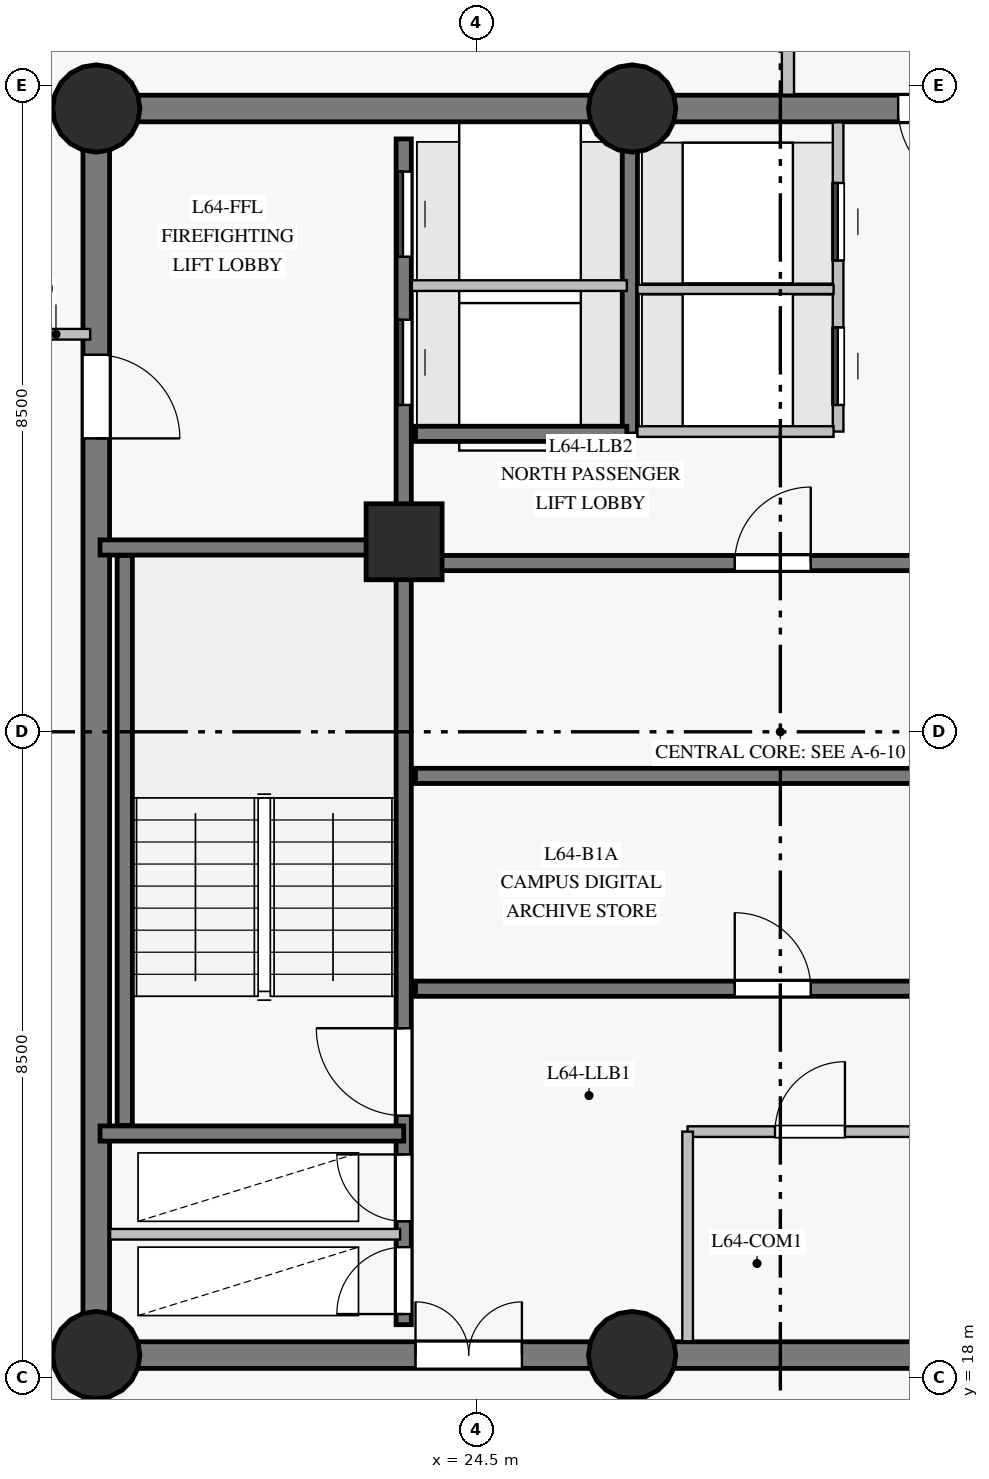
"""IFC4 building model, lengths in metres.
Left out: names, types, materials, properties, quantities, classifications, styles, units other than length and angle.
Written with IfcOpenShell. Run it as: python <this file> out.ifc"""

import sys

from ifc_helpers import new_model, si_unit, direction, frame, frame_2d, origin, origin_with_axes, origin_2d, place, context, subcontext, project, spatial, rectangle, circle, extrude, source, transform, mapped, element, fill, save


model = new_model("IFC4")
c1 = context("Model", 3, precision=1e-05, world=origin(), true_north=direction((0.0, 1.0)))
c2 = subcontext(c1, "Body", "Model", "MODEL_VIEW")
j1 = project(units=[si_unit("LENGTHUNIT", "METRE"), si_unit("PLANEANGLEUNIT", "RADIAN")], contexts=[c1])
p1 = place(None, origin())
s1 = spatial("IfcSite", under=j1, at=p1, CompositionType="ELEMENT")
p2 = place(p1, origin())
s2 = spatial("IfcBuilding", under=s1, at=p2, CompositionType="ELEMENT")
p3 = place(p2, frame((0.0, 0.0, 219.95)))
s3 = spatial("IfcBuildingStorey", under=s2, at=p3, CompositionType="ELEMENT", Elevation=219.95)
p4 = place(p3, frame((19.5, 18.3, 0.0), z_axis=(0.0, 0.0, 1.0), x_axis=(1.0, 0.0, 0.0)))
e1 = element("IfcWall", 1, at=p4, inside=s3, PredefinedType="SHEAR", context=c2, shape_type="SweptSolid", body=[
    extrude(rectangle(XDim=7.05, YDim=0.35, at=frame_2d((3.525, 0.0))), origin(), (0.0, 0.0, 1.0), 2.85),
])
p5 = place(p4, frame((4.2, 0.0, 0.0)))
e2 = element("IfcOpeningElement", 2, at=p5, cuts=e1, PredefinedType="OPENING", context=c2, shape_type="SweptSolid", body=[
    extrude(rectangle(XDim=1.4, YDim=2.2, at=frame_2d((0.7, 1.1))), frame((0.0, 0.185, 0.0), z_axis=(0.0, -1.0, 0.0), x_axis=(1.0, 0.0, 0.0)), (0.0, 0.0, 1.0), 0.37),
])
p6 = place(p3, frame((26.55, 18.3, 0.0), z_axis=(0.0, 0.0, 1.0), x_axis=(1.0, 0.0, 0.0)))
e3 = element("IfcWall", 3, at=p6, inside=s3, PredefinedType="SHEAR", context=c2, shape_type="SweptSolid", body=[
    extrude(rectangle(XDim=10.95, YDim=0.35, at=frame_2d((5.475, 0.0))), origin(), (0.0, 0.0, 1.0), 2.85),
])
p7 = place(p6, frame((4.55, 0.0, 0.0)))
e4 = element("IfcOpeningElement", 4, at=p7, cuts=e3, PredefinedType="OPENING", context=c2, shape_type="SweptSolid", body=[
    extrude(rectangle(XDim=1.4, YDim=2.2, at=frame_2d((0.7, 1.1))), frame((0.0, 0.185, 0.0), z_axis=(0.0, -1.0, 0.0), x_axis=(1.0, 0.0, 0.0)), (0.0, 0.0, 1.0), 0.37),
])
p8 = place(p3, frame((37.5, 34.7, 0.0), z_axis=(0.0, 0.0, 1.0), x_axis=(-1.0, 0.0, 0.0)))
e5 = element("IfcWall", 5, at=p8, inside=s3, PredefinedType="SHEAR", context=c2, shape_type="SweptSolid", body=[
    extrude(rectangle(XDim=10.95, YDim=0.35, at=frame_2d((5.475, 0.0))), origin(), (0.0, 0.0, 1.0), 2.85),
])
p9 = place(p8, frame((2.15, 0.0, 0.0)))
e6 = element("IfcOpeningElement", 6, at=p9, cuts=e5, PredefinedType="OPENING", context=c2, shape_type="SweptSolid", body=[
    extrude(rectangle(XDim=1.2, YDim=2.15, at=frame_2d((0.6, 1.075))), frame((0.0, 0.185, 0.0), z_axis=(0.0, -1.0, 0.0), x_axis=(1.0, 0.0, 0.0)), (0.0, 0.0, 1.0), 0.37),
])
p10 = place(p8, frame((6.35, 0.0, 0.0)))
e7 = element("IfcOpeningElement", 7, at=p10, cuts=e5, PredefinedType="OPENING", context=c2, shape_type="SweptSolid", body=[
    extrude(rectangle(XDim=1.1, YDim=2.15, at=frame_2d((0.55, 1.075))), frame((0.0, 0.185, 0.0), z_axis=(0.0, -1.0, 0.0), x_axis=(1.0, 0.0, 0.0)), (0.0, 0.0, 1.0), 0.37),
])
p11 = place(p3, frame((26.55, 34.7, 0.0), z_axis=(0.0, 0.0, 1.0), x_axis=(-1.0, 0.0, 0.0)))
e8 = element("IfcWall", 8, at=p11, inside=s3, PredefinedType="SHEAR", context=c2, shape_type="SweptSolid", body=[
    extrude(rectangle(XDim=7.05, YDim=0.35, at=frame_2d((3.525, 0.0))), origin(), (0.0, 0.0, 1.0), 2.85),
])
p12 = place(p3, frame((19.5, 34.7, 0.0), z_axis=(0.0, 0.0, 1.0), x_axis=(0.0, -1.0, 0.0)))
e9 = element("IfcWall", 9, at=p12, inside=s3, PredefinedType="SHEAR", context=c2, shape_type="SweptSolid", body=[
    extrude(rectangle(XDim=16.4, YDim=0.35, at=frame_2d((8.2, 0.0))), origin(), (0.0, 0.0, 1.0), 2.85),
])
p13 = place(p12, frame((3.24, 0.0, 0.0)))
e10 = element("IfcOpeningElement", 10, at=p13, cuts=e9, PredefinedType="OPENING", context=c2, shape_type="SweptSolid", body=[
    extrude(rectangle(XDim=1.1, YDim=2.15, at=frame_2d((0.55, 1.075))), frame((0.0, 0.185, 0.0), z_axis=(0.0, -1.0, 0.0), x_axis=(1.0, 0.0, 0.0)), (0.0, 0.0, 1.0), 0.37),
])
m1 = source(origin_with_axes(), c2, "Body", "SweptSolid", [
    extrude(circle(Radius=0.575, at=origin_2d()), origin(), (0.0, 0.0, 1.0), 3.05),
])
for number, where, z_axis, x_axis in (
    (11, (19.5, 18.3, 0.0), (0.0, 0.0, 1.0), (1.0, 0.0, 0.0)),
    (12, (26.55, 18.3, 0.0), (0.0, 0.0, 1.0), (1.0, 0.0, 0.0)),
    (13, (19.5, 34.7, 0.0), (0.0, 0.0, 1.0), (1.0, 0.0, 0.0)),
    (14, (26.55, 34.7, 0.0), (0.0, 0.0, 1.0), (1.0, 0.0, 0.0)),
):
    element("IfcColumn", number, at=place(p3, frame(where, z_axis=z_axis, x_axis=x_axis)), inside=s3, PredefinedType="COLUMN", context=c2, shape_type="MappedRepresentation", body=[
        mapped(m1, transform((0.0, 0.0, 0.0), scale=1.0)),
    ])
m2 = source(origin_with_axes(), c2, "Body", "SweptSolid", [
    extrude(rectangle(XDim=1.0, YDim=1.0, at=origin_2d()), origin(), (0.0, 0.0, 1.0), 3.05),
])
p14 = place(p3, frame((23.55, 29.0, 0.0), z_axis=(0.0, 0.0, 1.0), x_axis=(1.0, 0.0, 0.0)))
e15 = element("IfcColumn", 15, at=p14, inside=s3, PredefinedType="COLUMN", context=c2, shape_type="MappedRepresentation", body=[
    mapped(m2, transform((0.0, 0.0, 0.0), scale=1.0)),
])
p15 = place(p3, frame((23.545, 18.7, 0.0), z_axis=(0.0, 0.0, 1.0), x_axis=(0.0, 1.0, 0.0)))
e16 = element("IfcWall", 16, at=p15, inside=s3, PredefinedType="SHEAR", context=c2, shape_type="SweptSolid", body=[
    extrude(rectangle(XDim=15.6, YDim=0.2, at=frame_2d((7.8, 0.0))), origin(), (0.0, 0.0, 1.0), 2.85),
])
p16 = place(p15, frame((2.75, 0.0, 0.0)))
e17 = element("IfcOpeningElement", 17, at=p16, cuts=e16, PredefinedType="OPENING", context=c2, shape_type="SweptSolid", body=[
    extrude(rectangle(XDim=1.15, YDim=2.15, at=frame_2d((0.575, 1.075))), frame((0.0, 0.11, 0.0), z_axis=(0.0, -1.0, 0.0), x_axis=(1.0, 0.0, 0.0)), (0.0, 0.0, 1.0), 0.22),
])
p17 = place(p15, frame((0.14, 0.0, 0.0)))
e18 = element("IfcOpeningElement", 18, at=p17, cuts=e16, PredefinedType="OPENING", context=c2, shape_type="SweptSolid", body=[
    extrude(rectangle(XDim=0.88, YDim=2.1, at=frame_2d((0.44, 1.05))), frame((0.0, 0.11, 0.0), z_axis=(0.0, -1.0, 0.0), x_axis=(1.0, 0.0, 0.0)), (0.0, 0.0, 1.0), 0.22),
])
p18 = place(p15, frame((1.36, 0.0, 0.0)))
e19 = element("IfcOpeningElement", 19, at=p18, cuts=e16, PredefinedType="OPENING", context=c2, shape_type="SweptSolid", body=[
    extrude(rectangle(XDim=0.88, YDim=2.1, at=frame_2d((0.44, 1.05))), frame((0.0, 0.11, 0.0), z_axis=(0.0, -1.0, 0.0), x_axis=(1.0, 0.0, 0.0)), (0.0, 0.0, 1.0), 0.22),
])
p19 = place(p15, frame((12.1, 0.0, 0.0)))
e20 = element("IfcOpeningElement", 20, at=p19, cuts=e16, PredefinedType="OPENING", context=c2, shape_type="SweptSolid", body=[
    extrude(rectangle(XDim=1.12, YDim=2.15, at=frame_2d((0.56, 1.075))), frame((0.0, 0.11, 0.0), z_axis=(0.0, -1.0, 0.0), x_axis=(1.0, 0.0, 0.0)), (0.0, 0.0, 1.0), 0.22),
])
p20 = place(p15, frame((14.05, 0.0, 0.0)))
e21 = element("IfcOpeningElement", 21, at=p20, cuts=e16, PredefinedType="OPENING", context=c2, shape_type="SweptSolid", body=[
    extrude(rectangle(XDim=1.12, YDim=2.15, at=frame_2d((0.56, 1.075))), frame((0.0, 0.11, 0.0), z_axis=(0.0, -1.0, 0.0), x_axis=(1.0, 0.0, 0.0)), (0.0, 0.0, 1.0), 0.22),
])
p21 = place(p3, frame((23.7, 23.12, 0.0), z_axis=(0.0, 0.0, 1.0), x_axis=(1.0, 0.0, 0.0)))
e22 = element("IfcWall", 22, at=p21, inside=s3, PredefinedType="SHEAR", context=c2, shape_type="SweptSolid", body=[
    extrude(rectangle(XDim=9.6, YDim=0.2, at=frame_2d((4.8, 0.0))), origin(), (0.0, 0.0, 1.0), 2.85),
])
p22 = place(p21, frame((4.2, 0.0, 0.0)))
e23 = element("IfcOpeningElement", 23, at=p22, cuts=e22, PredefinedType="OPENING", context=c2, shape_type="SweptSolid", body=[
    extrude(rectangle(XDim=1.0, YDim=2.15, at=frame_2d((0.5, 1.075))), frame((0.0, 0.11, 0.0), z_axis=(0.0, -1.0, 0.0), x_axis=(1.0, 0.0, 0.0)), (0.0, 0.0, 1.0), 0.22),
])
p23 = place(p3, frame((23.7, 25.92, 0.0), z_axis=(0.0, 0.0, 1.0), x_axis=(1.0, 0.0, 0.0)))
e24 = element("IfcWall", 24, at=p23, inside=s3, PredefinedType="SHEAR", context=c2, shape_type="SweptSolid", body=[
    extrude(rectangle(XDim=9.6, YDim=0.2, at=frame_2d((4.8, 0.0))), origin(), (0.0, 0.0, 1.0), 2.85),
])
p24 = place(p3, frame((23.7, 28.72, 0.0), z_axis=(0.0, 0.0, 1.0), x_axis=(1.0, 0.0, 0.0)))
e25 = element("IfcWall", 25, at=p24, inside=s3, PredefinedType="SHEAR", context=c2, shape_type="SweptSolid", body=[
    extrude(rectangle(XDim=9.6, YDim=0.2, at=frame_2d((4.8, 0.0))), origin(), (0.0, 0.0, 1.0), 2.85),
])
p25 = place(p24, frame((4.2, 0.0, 0.0)))
e26 = element("IfcOpeningElement", 26, at=p25, cuts=e25, PredefinedType="OPENING", context=c2, shape_type="SweptSolid", body=[
    extrude(rectangle(XDim=1.0, YDim=2.15, at=frame_2d((0.5, 1.075))), frame((0.0, 0.11, 0.0), z_axis=(0.0, -1.0, 0.0), x_axis=(1.0, 0.0, 0.0)), (0.0, 0.0, 1.0), 0.22),
])
p26 = place(p3, frame((19.875, 21.32, 0.0), z_axis=(0.0, 0.0, 1.0), x_axis=(0.0, 1.0, 0.0)))
e27 = element("IfcWall", 27, at=p26, inside=s3, PredefinedType="SHEAR", context=c2, shape_type="SweptSolid", body=[
    extrude(rectangle(XDim=7.5, YDim=0.2, at=frame_2d((3.75, 0.0))), origin(), (0.0, 0.0, 1.0), 2.85),
])
for number, where, z_axis, x_axis in (
    (28, (19.55, 21.215, 0.0), (0.0, 0.0, 1.0), (1.0, 0.0, 0.0)),
    (29, (19.55, 28.925, 0.0), (0.0, 0.0, 1.0), (1.0, 0.0, 0.0)),
):
    element("IfcWall", number, at=place(p3, frame(where, z_axis=z_axis, x_axis=x_axis)), inside=s3, PredefinedType="SHEAR", context=c2, shape_type="SweptSolid", body=[
        extrude(rectangle(XDim=3.995, YDim=0.2, at=frame_2d((1.998, 0.0))), origin(), (0.0, 0.0, 1.0), 2.85),
    ])
p27 = place(p3, frame((26.52, 30.42, 0.0), z_axis=(0.0, 0.0, 1.0), x_axis=(0.0, 1.0, 0.0)))
e30 = element("IfcWall", 30, at=p27, inside=s3, PredefinedType="SHEAR", context=c2, shape_type="SweptSolid", body=[
    extrude(rectangle(XDim=3.86, YDim=0.2, at=frame_2d((1.93, 0.0))), origin(), (0.0, 0.0, 1.0), 2.85),
])
p28 = place(p3, frame((23.7, 30.42, 0.0), z_axis=(0.0, 0.0, 1.0), x_axis=(1.0, 0.0, 0.0)))
e31 = element("IfcWall", 31, at=p28, inside=s3, PredefinedType="SHEAR", context=c2, shape_type="SweptSolid", body=[
    extrude(rectangle(XDim=2.78, YDim=0.2, at=frame_2d((1.39, 0.0))), origin(), (0.0, 0.0, 1.0), 2.85),
])
p29 = place(p3, frame((29.26, 30.45, 0.0), z_axis=(0.0, 0.0, 1.0), x_axis=(0.0, 1.0, 0.0)))
e32 = element("IfcWall", 32, at=p29, inside=s3, PredefinedType="PARTITIONING", context=c2, shape_type="SweptSolid", body=[
    extrude(rectangle(XDim=4.068, YDim=0.14, at=frame_2d((2.034, 0.0))), origin(), (0.0, 0.0, 1.0), 2.85),
])
p30 = place(p29, frame((0.35, 0.0, 0.0)))
e33 = element("IfcOpeningElement", 33, at=p30, cuts=e32, PredefinedType="OPENING", context=c2, shape_type="SweptSolid", body=[
    extrude(rectangle(XDim=1.02, YDim=2.15, at=frame_2d((0.51, 1.075))), frame((0.0, 0.08, 0.0), z_axis=(0.0, -1.0, 0.0), x_axis=(1.0, 0.0, 0.0)), (0.0, 0.0, 1.0), 0.16),
])
p31 = place(p29, frame((2.25, 0.0, 0.0)))
e34 = element("IfcOpeningElement", 34, at=p31, cuts=e32, PredefinedType="OPENING", context=c2, shape_type="SweptSolid", body=[
    extrude(rectangle(XDim=1.02, YDim=2.15, at=frame_2d((0.51, 1.075))), frame((0.0, 0.08, 0.0), z_axis=(0.0, -1.0, 0.0), x_axis=(1.0, 0.0, 0.0)), (0.0, 0.0, 1.0), 0.16),
])
p32 = place(p3, frame((19.682, 19.89, 0.0), z_axis=(0.0, 0.0, 1.0), x_axis=(1.0, 0.0, 0.0)))
e35 = element("IfcWall", 35, at=p32, inside=s3, PredefinedType="PARTITIONING", context=c2, shape_type="SweptSolid", body=[
    extrude(rectangle(XDim=3.815, YDim=0.14, at=frame_2d((1.908, 0.0))), origin(), (0.0, 0.0, 1.0), 2.85),
])
p33 = place(p3, frame((27.28, 21.24, 0.0), z_axis=(0.0, 0.0, 1.0), x_axis=(1.0, 0.0, 0.0)))
e36 = element("IfcWall", 36, at=p33, inside=s3, PredefinedType="PARTITIONING", context=c2, shape_type="SweptSolid", body=[
    extrude(rectangle(XDim=3.44, YDim=0.14, at=frame_2d((1.72, 0.0))), origin(), (0.0, 0.0, 1.0), 2.85),
])
p34 = place(p33, frame((1.15, 0.0, 0.0)))
e37 = element("IfcOpeningElement", 37, at=p34, cuts=e36, PredefinedType="OPENING", context=c2, shape_type="SweptSolid", body=[
    extrude(rectangle(XDim=0.92, YDim=2.1, at=frame_2d((0.46, 1.05))), frame((0.0, 0.08, 0.0), z_axis=(0.0, -1.0, 0.0), x_axis=(1.0, 0.0, 0.0)), (0.0, 0.0, 1.0), 0.16),
])
p35 = place(p3, frame((23.652, 32.37, 0.0), z_axis=(0.0, 0.0, 1.0), x_axis=(1.0, 0.0, 0.0)))
e38 = element("IfcWall", 38, at=p35, inside=s3, PredefinedType="PARTITIONING", context=c2, shape_type="SweptSolid", body=[
    extrude(rectangle(XDim=2.828, YDim=0.14, at=frame_2d((1.414, 0.0))), origin(), (0.0, 0.0, 1.0), 2.85),
])
p36 = place(p3, frame((19.42, 31.73, 0.0), z_axis=(0.0, 0.0, 1.0), x_axis=(-1.0, 0.0, 0.0)))
e39 = element("IfcWall", 39, at=p36, inside=s3, PredefinedType="PARTITIONING", context=c2, shape_type="SweptSolid", body=[
    extrude(rectangle(XDim=2.75, YDim=0.14, at=frame_2d((1.375, 0.0))), origin(), (0.0, 0.0, 1.0), 2.85),
])
p37 = place(p36, frame((0.9, 0.0, 0.0)))
e40 = element("IfcOpeningElement", 40, at=p37, cuts=e39, PredefinedType="OPENING", context=c2, shape_type="SweptSolid", body=[
    extrude(rectangle(XDim=0.96, YDim=2.15, at=frame_2d((0.48, 1.075))), frame((0.0, 0.08, 0.0), z_axis=(0.0, -1.0, 0.0), x_axis=(1.0, 0.0, 0.0)), (0.0, 0.0, 1.0), 0.16),
])
p38 = place(p3, frame((27.28, 18.482, 0.0), z_axis=(0.0, 0.0, 1.0), x_axis=(0.0, 1.0, 0.0)))
e41 = element("IfcWall", 41, at=p38, inside=s3, PredefinedType="PARTITIONING", context=c2, shape_type="SweptSolid", body=[
    extrude(rectangle(XDim=2.758, YDim=0.14, at=frame_2d((1.379, 0.0))), origin(), (0.0, 0.0, 1.0), 2.85),
])
p39 = place(p3, frame((26.62, 30.45, 0.0), z_axis=(0.0, 0.0, 1.0), x_axis=(1.0, 0.0, 0.0)))
e42 = element("IfcWall", 42, at=p39, inside=s3, PredefinedType="PARTITIONING", context=c2, shape_type="SweptSolid", body=[
    extrude(rectangle(XDim=2.58, YDim=0.14, at=frame_2d((1.29, 0.0))), origin(), (0.0, 0.0, 1.0), 2.85),
])
p40 = place(p3, frame((26.62, 32.32, 0.0), z_axis=(0.0, 0.0, 1.0), x_axis=(1.0, 0.0, 0.0)))
e43 = element("IfcWall", 43, at=p40, inside=s3, PredefinedType="PARTITIONING", context=c2, shape_type="SweptSolid", body=[
    extrude(rectangle(XDim=2.58, YDim=0.12, at=frame_2d((1.29, 0.0))), origin(), (0.0, 0.0, 1.0), 2.85),
])
p41 = place(p3, frame((28.6, 34.882, 0.0), z_axis=(0.0, 0.0, 1.0), x_axis=(0.0, 1.0, 0.0)))
e44 = element("IfcWall", 44, at=p41, inside=s3, PredefinedType="PARTITIONING", context=c2, shape_type="SweptSolid", body=[
    extrude(rectangle(XDim=1.518, YDim=0.16, at=frame_2d((0.759, 0.0))), origin(), (0.0, 0.0, 1.0), 2.85),
])
m3 = source(origin_with_axes(), c2, "Body", "SweptSolid", [
    extrude(rectangle(XDim=1.15, YDim=2.15, at=frame_2d((0.575, 1.075))), frame((0.0, 0.025, 0.0), z_axis=(0.0, -1.0, 0.0), x_axis=(1.0, 0.0, 0.0)), (0.0, 0.0, 1.0), 0.05),
])
p42 = place(p16, origin())
e45 = element("IfcDoor", 45, at=p42, inside=s3, OperationType="SINGLE_SWING_RIGHT", PredefinedType="DOOR", context=c2, shape_type="MappedRepresentation", body=[
    mapped(m3, transform((0.0, 0.0, 0.0), scale=1.0)),
])
fill(e17, e45)
m4 = source(origin_with_axes(), c2, "Body", "SweptSolid", [
    extrude(rectangle(XDim=1.1, YDim=2.15, at=frame_2d((0.55, 1.075))), frame((0.0, 0.025, 0.0), z_axis=(0.0, -1.0, 0.0), x_axis=(1.0, 0.0, 0.0)), (0.0, 0.0, 1.0), 0.05),
])
p43 = place(p13, origin())
e46 = element("IfcDoor", 46, at=p43, inside=s3, OperationType="SINGLE_SWING_RIGHT", PredefinedType="DOOR", context=c2, shape_type="MappedRepresentation", body=[
    mapped(m4, transform((0.0, 0.0, 0.0), scale=1.0)),
])
fill(e10, e46)
m5 = source(origin_with_axes(), c2, "Body", "SweptSolid", [
    extrude(rectangle(XDim=0.88, YDim=2.1, at=frame_2d((0.44, 1.05))), frame((0.0, 0.025, 0.0), z_axis=(0.0, -1.0, 0.0), x_axis=(1.0, 0.0, 0.0)), (0.0, 0.0, 1.0), 0.05),
])
p44 = place(p17, origin())
e47 = element("IfcDoor", 47, at=p44, inside=s3, OperationType="SINGLE_SWING_LEFT", PredefinedType="DOOR", context=c2, shape_type="MappedRepresentation", body=[
    mapped(m5, transform((0.0, 0.0, 0.0), scale=1.0)),
])
fill(e18, e47)
p45 = place(p18, origin())
e48 = element("IfcDoor", 48, at=p45, inside=s3, OperationType="SINGLE_SWING_RIGHT", PredefinedType="DOOR", context=c2, shape_type="MappedRepresentation", body=[
    mapped(m5, transform((0.0, 0.0, 0.0), scale=1.0)),
])
fill(e19, e48)
m6 = source(origin_with_axes(), c2, "Body", "SweptSolid", [
    extrude(rectangle(XDim=1.4, YDim=2.2, at=frame_2d((0.7, 1.1))), frame((0.0, 0.025, 0.0), z_axis=(0.0, -1.0, 0.0), x_axis=(1.0, 0.0, 0.0)), (0.0, 0.0, 1.0), 0.05),
])
p46 = place(p5, origin())
e49 = element("IfcDoor", 49, at=p46, inside=s3, OperationType="DOUBLE_DOOR_SINGLE_SWING", PredefinedType="DOOR", context=c2, shape_type="MappedRepresentation", body=[
    mapped(m6, transform((0.0, 0.0, 0.0), scale=1.0)),
])
fill(e2, e49)
m7 = source(origin_with_axes(), c2, "Body", "SweptSolid", [
    extrude(rectangle(XDim=0.92, YDim=2.1, at=frame_2d((0.46, 1.05))), frame((0.0, 0.025, 0.0), z_axis=(0.0, -1.0, 0.0), x_axis=(1.0, 0.0, 0.0)), (0.0, 0.0, 1.0), 0.05),
])
p47 = place(p34, origin())
e50 = element("IfcDoor", 50, at=p47, inside=s3, OperationType="SINGLE_SWING_RIGHT", PredefinedType="DOOR", context=c2, shape_type="MappedRepresentation", body=[
    mapped(m7, transform((0.0, 0.0, 0.0), scale=1.0)),
])
fill(e37, e50)
m8 = source(origin_with_axes(), c2, "Body", "SweptSolid", [
    extrude(rectangle(XDim=1.0, YDim=2.15, at=frame_2d((0.5, 1.075))), frame((0.0, 0.025, 0.0), z_axis=(0.0, -1.0, 0.0), x_axis=(1.0, 0.0, 0.0)), (0.0, 0.0, 1.0), 0.05),
])
p48 = place(p22, origin())
e51 = element("IfcDoor", 51, at=p48, inside=s3, OperationType="SINGLE_SWING_LEFT", PredefinedType="DOOR", context=c2, shape_type="MappedRepresentation", body=[
    mapped(m8, transform((0.0, 0.0, 0.0), scale=1.0)),
])
fill(e23, e51)
p49 = place(p25, origin())
e52 = element("IfcDoor", 52, at=p49, inside=s3, OperationType="SINGLE_SWING_RIGHT", PredefinedType="DOOR", context=c2, shape_type="MappedRepresentation", body=[
    mapped(m8, transform((0.0, 0.0, 0.0), scale=1.0)),
])
fill(e26, e52)
p50 = place(p10, origin())
e53 = element("IfcDoor", 53, at=p50, inside=s3, OperationType="SINGLE_SWING_LEFT", PredefinedType="DOOR", context=c2, shape_type="MappedRepresentation", body=[
    mapped(m4, transform((0.0, 0.0, 0.0), scale=1.0)),
])
fill(e7, e53)
m9 = source(origin_with_axes(), c2, "Body", "SweptSolid", [
    extrude(rectangle(XDim=1.12, YDim=2.15, at=frame_2d((0.56, 1.075))), frame((0.0, 0.025, 0.0), z_axis=(0.0, -1.0, 0.0), x_axis=(1.0, 0.0, 0.0)), (0.0, 0.0, 1.0), 0.05),
])
p51 = place(p19, origin())
e54 = element("IfcDoor", 54, at=p51, inside=s3, OperationType="SLIDING_TO_LEFT", PredefinedType="DOOR", context=c2, shape_type="MappedRepresentation", body=[
    mapped(m9, transform((0.0, 0.0, 0.0), scale=1.0)),
])
fill(e20, e54)
p52 = place(p20, origin())
e55 = element("IfcDoor", 55, at=p52, inside=s3, OperationType="SLIDING_TO_RIGHT", PredefinedType="DOOR", context=c2, shape_type="MappedRepresentation", body=[
    mapped(m9, transform((0.0, 0.0, 0.0), scale=1.0)),
])
fill(e21, e55)
m10 = source(origin_with_axes(), c2, "Body", "SweptSolid", [
    extrude(rectangle(XDim=1.02, YDim=2.15, at=frame_2d((0.51, 1.075))), frame((0.0, 0.025, 0.0), z_axis=(0.0, -1.0, 0.0), x_axis=(1.0, 0.0, 0.0)), (0.0, 0.0, 1.0), 0.05),
])
p53 = place(p30, origin())
e56 = element("IfcDoor", 56, at=p53, inside=s3, OperationType="SLIDING_TO_LEFT", PredefinedType="DOOR", context=c2, shape_type="MappedRepresentation", body=[
    mapped(m10, transform((0.0, 0.0, 0.0), scale=1.0)),
])
fill(e33, e56)
p54 = place(p31, origin())
e57 = element("IfcDoor", 57, at=p54, inside=s3, OperationType="SLIDING_TO_LEFT", PredefinedType="DOOR", context=c2, shape_type="MappedRepresentation", body=[
    mapped(m10, transform((0.0, 0.0, 0.0), scale=1.0)),
])
fill(e34, e57)
save(model, sys.argv[1])
